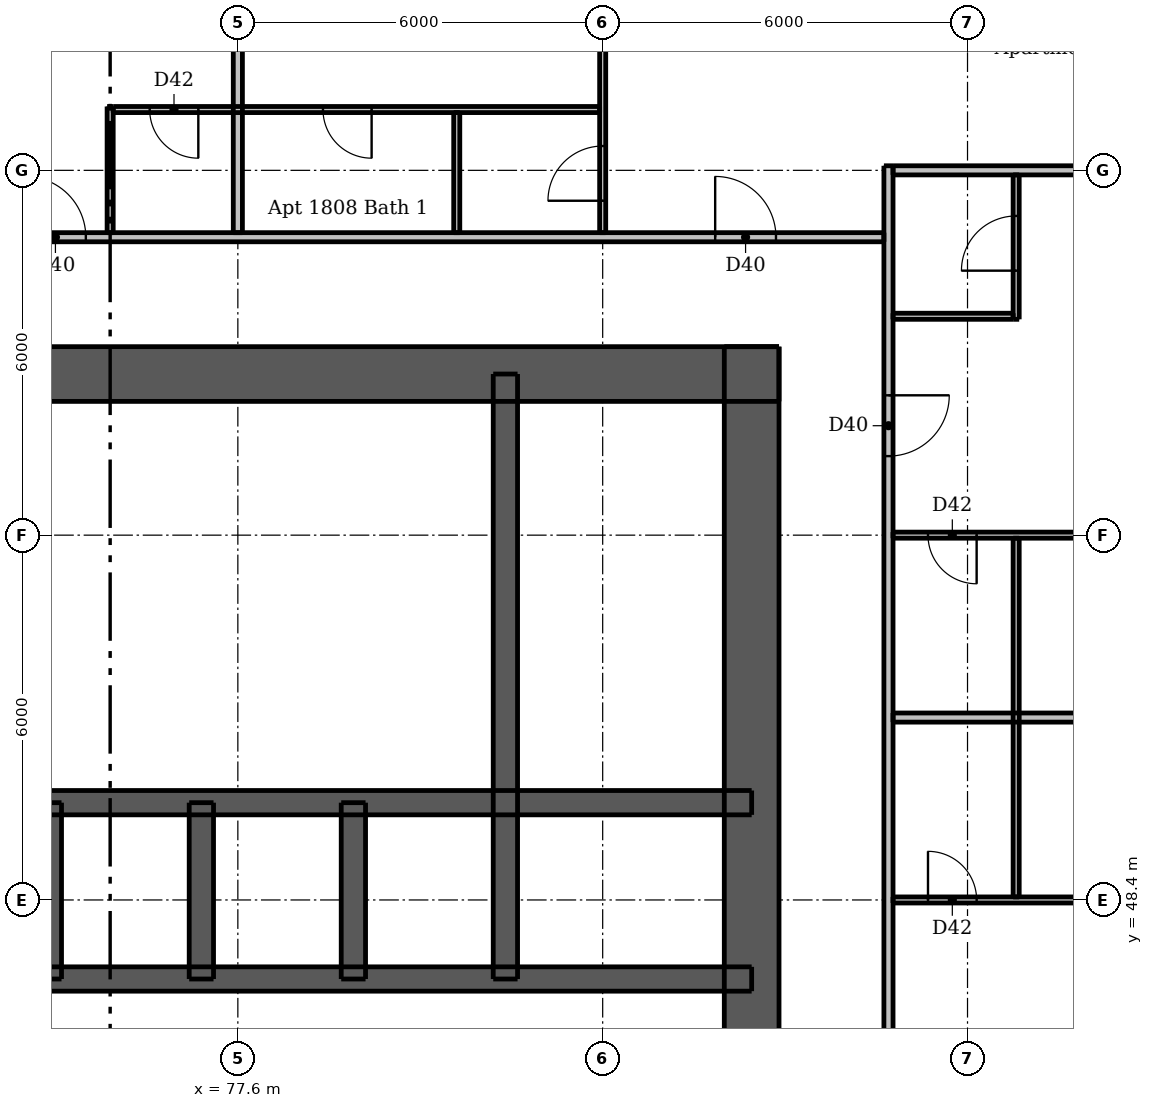
"""IFC4 building model, lengths in metres.
Left out: names, types, materials, properties, quantities, classifications, styles, units other than length and angle.
Written with IfcOpenShell. Run it as: python <this file> out.ifc"""

import sys

from ifc_helpers import new_model, si_unit, direction, frame, frame_2d, origin, place, context, subcontext, project, spatial, rectangle, extrude, element, fill, save


model = new_model("IFC4")
c1 = context("Model", 3, precision=1e-05, world=origin(), true_north=direction((0.0, 1.0)))
c2 = subcontext(c1, "Body", "Model", "MODEL_VIEW")
j1 = project(units=[si_unit("LENGTHUNIT", "METRE"), si_unit("PLANEANGLEUNIT", "RADIAN")], contexts=[c1])
p1 = place(None, origin())
s1 = spatial("IfcSite", under=j1, at=p1, CompositionType="ELEMENT")
p2 = place(p1, origin())
s2 = spatial("IfcBuilding", under=s1, at=p2, CompositionType="ELEMENT")
p3 = place(p2, frame((0.0, 0.0, 66.4)))
s3 = spatial("IfcBuildingStorey", under=s2, at=p3, CompositionType="ELEMENT", Elevation=66.4)
p4 = place(p3, frame((62.5, 57.05, 0.0), z_axis=(0.0, 0.0, 1.0), x_axis=(1.0, 0.0, 0.0)))
e1 = element("IfcWall", 1, at=p4, inside=s3, PredefinedType="SHEAR", context=c2, shape_type="SweptSolid", body=[
    extrude(rectangle(XDim=24.0, YDim=0.9, at=frame_2d((12.0, 0.0))), origin(), (0.0, 0.0, 1.0), 2.95),
])
p5 = place(p4, frame((20.85, 0.0, 0.0)))
e2 = element("IfcOpeningElement", 2, at=p5, cuts=e1, PredefinedType="OPENING", context=c2, shape_type="SweptSolid", body=[
    extrude(rectangle(XDim=1.1, YDim=2.1, at=frame_2d((0.55, 1.05))), frame((0.0, 0.46, 0.0), z_axis=(0.0, -1.0, 0.0), x_axis=(1.0, 0.0, 0.0)), (0.0, 0.0, 1.0), 0.92),
])
p6 = place(p4, frame((2.05, 0.0, 0.0)))
e3 = element("IfcOpeningElement", 3, at=p6, cuts=e1, PredefinedType="OPENING", context=c2, shape_type="SweptSolid", body=[
    extrude(rectangle(XDim=1.1, YDim=2.1, at=frame_2d((0.55, 1.05))), frame((0.0, 0.46, 0.0), z_axis=(0.0, -1.0, 0.0), x_axis=(1.0, 0.0, 0.0)), (0.0, 0.0, 1.0), 0.92),
])
p7 = place(p4, frame((6.44, 0.0, 0.0)))
e4 = element("IfcOpeningElement", 4, at=p7, cuts=e1, PredefinedType="OPENING", context=c2, shape_type="SweptSolid", body=[
    extrude(rectangle(XDim=0.9, YDim=2.1, at=frame_2d((0.45, 1.05))), frame((0.0, 0.46, 0.0), z_axis=(0.0, -1.0, 0.0), x_axis=(1.0, 0.0, 0.0)), (0.0, 0.0, 1.0), 0.92),
])
p8 = place(p4, frame((13.74, 0.0, 0.0)))
e5 = element("IfcOpeningElement", 5, at=p8, cuts=e1, PredefinedType="OPENING", context=c2, shape_type="SweptSolid", body=[
    extrude(rectangle(XDim=0.9, YDim=2.1, at=frame_2d((0.45, 1.05))), frame((0.0, 0.46, 0.0), z_axis=(0.0, -1.0, 0.0), x_axis=(1.0, 0.0, 0.0)), (0.0, 0.0, 1.0), 0.92),
])
p9 = place(p3, frame((86.05, 33.5, 0.0), z_axis=(0.0, 0.0, 1.0), x_axis=(0.0, 1.0, 0.0)))
e6 = element("IfcWall", 6, at=p9, inside=s3, PredefinedType="SHEAR", context=c2, shape_type="SweptSolid", body=[
    extrude(rectangle(XDim=24.0, YDim=0.9, at=frame_2d((12.0, 0.0))), origin(), (0.0, 0.0, 1.0), 2.95),
])
p10 = place(p9, frame((11.2, 0.0, 0.0)))
e7 = element("IfcOpeningElement", 7, at=p10, cuts=e6, PredefinedType="OPENING", context=c2, shape_type="SweptSolid", body=[
    extrude(rectangle(XDim=1.6, YDim=2.1, at=frame_2d((0.8, 1.05))), frame((0.0, 0.46, 0.0), z_axis=(0.0, -1.0, 0.0), x_axis=(1.0, 0.0, 0.0)), (0.0, 0.0, 1.0), 0.92),
])
p11 = place(p3, frame((62.95, 47.1, 0.0), z_axis=(0.0, 0.0, 1.0), x_axis=(1.0, 0.0, 0.0)))
e8 = element("IfcWall", 8, at=p11, inside=s3, PredefinedType="SHEAR", context=c2, shape_type="SweptSolid", body=[
    extrude(rectangle(XDim=23.1, YDim=0.4, at=frame_2d((11.55, 0.0))), origin(), (0.0, 0.0, 1.0), 2.95),
])
p12 = place(p11, frame((0.662, 0.0, 0.0)))
e9 = element("IfcOpeningElement", 9, at=p12, cuts=e8, PredefinedType="OPENING", context=c2, shape_type="SweptSolid", body=[
    extrude(rectangle(XDim=0.8, YDim=2.1, at=frame_2d((0.4, 1.05))), frame((0.0, 0.21, 0.0), z_axis=(0.0, -1.0, 0.0), x_axis=(1.0, 0.0, 0.0)), (0.0, 0.0, 1.0), 0.42),
])
p13 = place(p11, frame((2.312, 0.0, 0.0)))
e10 = element("IfcOpeningElement", 10, at=p13, cuts=e8, PredefinedType="OPENING", context=c2, shape_type="SweptSolid", body=[
    extrude(rectangle(XDim=0.9, YDim=2.1, at=frame_2d((0.45, 1.05))), frame((0.0, 0.21, 0.0), z_axis=(0.0, -1.0, 0.0), x_axis=(1.0, 0.0, 0.0)), (0.0, 0.0, 1.0), 0.42),
])
p14 = place(p11, frame((20.5, 0.0, 0.0)))
e11 = element("IfcOpeningElement", 11, at=p14, cuts=e8, PredefinedType="OPENING", context=c2, shape_type="SweptSolid", body=[
    extrude(rectangle(XDim=0.9, YDim=2.1, at=frame_2d((0.45, 1.05))), frame((0.0, 0.21, 0.0), z_axis=(0.0, -1.0, 0.0), x_axis=(1.0, 0.0, 0.0)), (0.0, 0.0, 1.0), 0.42),
])
p15 = place(p3, frame((62.95, 50.0, 0.0), z_axis=(0.0, 0.0, 1.0), x_axis=(1.0, 0.0, 0.0)))
e12 = element("IfcWall", 12, at=p15, inside=s3, PredefinedType="SHEAR", context=c2, shape_type="SweptSolid", body=[
    extrude(rectangle(XDim=23.1, YDim=0.4, at=frame_2d((11.55, 0.0))), origin(), (0.0, 0.0, 1.0), 2.95),
])
p16 = place(p3, frame((82.0, 47.1, 0.0), z_axis=(0.0, 0.0, 1.0), x_axis=(0.0, 1.0, 0.0)))
e13 = element("IfcWall", 13, at=p16, inside=s3, PredefinedType="SHEAR", context=c2, shape_type="SweptSolid", body=[
    extrude(rectangle(XDim=9.95, YDim=0.4, at=frame_2d((4.975, 0.0))), origin(), (0.0, 0.0, 1.0), 2.95),
])
for number, where, z_axis, x_axis in (
    (14, (74.5, 47.1, 0.0), (0.0, 0.0, 1.0), (0.0, 1.0, 0.0)),
    (15, (77.0, 47.1, 0.0), (0.0, 0.0, 1.0), (0.0, 1.0, 0.0)),
    (16, (79.5, 47.1, 0.0), (0.0, 0.0, 1.0), (0.0, 1.0, 0.0)),
):
    element("IfcWall", number, at=place(p3, frame(where, z_axis=z_axis, x_axis=x_axis)), inside=s3, PredefinedType="SHEAR", context=c2, shape_type="SweptSolid", body=[
        extrude(rectangle(XDim=2.9, YDim=0.4, at=frame_2d((1.45, 0.0))), origin(), (0.0, 0.0, 1.0), 2.95),
    ])
p17 = place(p3, frame((75.5, 59.375, 0.0), z_axis=(0.0, 0.0, 1.0), x_axis=(0.0, 1.0, 0.0)))
e17 = element("IfcWall", 17, at=p17, inside=s3, PredefinedType="PARTITIONING", context=c2, shape_type="SweptSolid", body=[
    extrude(rectangle(XDim=2.075, YDim=0.1, at=frame_2d((1.038, 0.0))), origin(), (0.0, 0.0, 1.0), 2.95),
])
p18 = place(p3, frame((81.2, 59.375, 0.0), z_axis=(0.0, 0.0, 1.0), x_axis=(0.0, 1.0, 0.0)))
e18 = element("IfcWall", 18, at=p18, inside=s3, PredefinedType="PARTITIONING", context=c2, shape_type="SweptSolid", body=[
    extrude(rectangle(XDim=1.975, YDim=0.1, at=frame_2d((0.988, 0.0))), origin(), (0.0, 0.0, 1.0), 2.95),
])
p19 = place(p3, frame((83.6, 59.375, 0.0), z_axis=(0.0, 0.0, 1.0), x_axis=(0.0, 1.0, 0.0)))
e19 = element("IfcWall", 19, at=p19, inside=s3, PredefinedType="PARTITIONING", context=c2, shape_type="SweptSolid", body=[
    extrude(rectangle(XDim=8.625, YDim=0.1, at=frame_2d((4.312, 0.0))), origin(), (0.0, 0.0, 1.0), 2.332),
])
p20 = place(p19, frame((0.525, 0.0, 0.0)))
e20 = element("IfcOpeningElement", 20, at=p20, cuts=e19, PredefinedType="OPENING", context=c2, shape_type="SweptSolid", body=[
    extrude(rectangle(XDim=0.9, YDim=2.1, at=frame_2d((0.45, 1.05))), frame((0.0, 0.06, 0.0), z_axis=(0.0, -1.0, 0.0), x_axis=(1.0, 0.0, 0.0)), (0.0, 0.0, 1.0), 0.12),
])
p21 = place(p19, frame((4.875, 0.0, 0.0)))
e21 = element("IfcOpeningElement", 21, at=p21, cuts=e19, PredefinedType="OPENING", context=c2, shape_type="SweptSolid", body=[
    extrude(rectangle(XDim=0.9, YDim=2.1, at=frame_2d((0.45, 1.05))), frame((0.0, 0.06, 0.0), z_axis=(0.0, -1.0, 0.0), x_axis=(1.0, 0.0, 0.0)), (0.0, 0.0, 1.0), 0.12),
])
p22 = place(p3, frame((90.4, 48.45, 0.0), z_axis=(0.0, 0.0, 1.0), x_axis=(0.0, 1.0, 0.0)))
e22 = element("IfcWall", 22, at=p22, inside=s3, PredefinedType="PARTITIONING", context=c2, shape_type="SweptSolid", body=[
    extrude(rectangle(XDim=5.9, YDim=0.1, at=frame_2d((2.95, 0.0))), origin(), (0.0, 0.0, 1.0), 2.95),
])
p23 = place(p3, frame((90.4, 57.95, 0.0), z_axis=(0.0, 0.0, 1.0), x_axis=(0.0, 1.0, 0.0)))
e23 = element("IfcWall", 23, at=p23, inside=s3, PredefinedType="PARTITIONING", context=c2, shape_type="SweptSolid", body=[
    extrude(rectangle(XDim=2.375, YDim=0.1, at=frame_2d((1.188, 0.0))), origin(), (0.0, 0.0, 1.0), 2.95),
])
p24 = place(p23, frame((0.8, 0.0, 0.0)))
e24 = element("IfcOpeningElement", 24, at=p24, cuts=e23, PredefinedType="OPENING", context=c2, shape_type="SweptSolid", body=[
    extrude(rectangle(XDim=0.9, YDim=2.1, at=frame_2d((0.45, 1.05))), frame((0.0, 0.06, 0.0), z_axis=(0.0, -1.0, 0.0), x_axis=(1.0, 0.0, 0.0)), (0.0, 0.0, 1.0), 0.12),
])
p25 = place(p3, frame((83.55, 61.4, 0.0), z_axis=(0.0, 0.0, 1.0), x_axis=(-1.0, 0.0, 0.0)))
e25 = element("IfcWall", 25, at=p25, inside=s3, PredefinedType="PARTITIONING", context=c2, shape_type="SweptSolid", body=[
    extrude(rectangle(XDim=8.0, YDim=0.1, at=frame_2d((4.0, 0.0))), origin(), (0.0, 0.0, 1.0), 2.95),
])
p26 = place(p25, frame((6.6, 0.0, 0.0)))
e26 = element("IfcOpeningElement", 26, at=p26, cuts=e25, PredefinedType="OPENING", context=c2, shape_type="SweptSolid", body=[
    extrude(rectangle(XDim=0.8, YDim=2.1, at=frame_2d((0.4, 1.05))), frame((0.0, 0.06, 0.0), z_axis=(0.0, -1.0, 0.0), x_axis=(1.0, 0.0, 0.0)), (0.0, 0.0, 1.0), 0.12),
])
p27 = place(p25, frame((3.75, 0.0, 0.0)))
e27 = element("IfcOpeningElement", 27, at=p27, cuts=e25, PredefinedType="OPENING", context=c2, shape_type="SweptSolid", body=[
    extrude(rectangle(XDim=0.8, YDim=2.1, at=frame_2d((0.4, 1.05))), frame((0.0, 0.06, 0.0), z_axis=(0.0, -1.0, 0.0), x_axis=(1.0, 0.0, 0.0)), (0.0, 0.0, 1.0), 0.12),
])
p28 = place(p3, frame((88.375, 58.0, 0.0), z_axis=(0.0, 0.0, 1.0), x_axis=(1.0, 0.0, 0.0)))
e28 = element("IfcWall", 28, at=p28, inside=s3, PredefinedType="PARTITIONING", context=c2, shape_type="SweptSolid", body=[
    extrude(rectangle(XDim=1.975, YDim=0.1, at=frame_2d((0.988, 0.0))), origin(), (0.0, 0.0, 1.0), 2.95),
])
p29 = place(p3, frame((98.5, 54.4, 0.0), z_axis=(0.0, 0.0, 1.0), x_axis=(-1.0, 0.0, 0.0)))
e29 = element("IfcWall", 29, at=p29, inside=s3, PredefinedType="PARTITIONING", context=c2, shape_type="SweptSolid", body=[
    extrude(rectangle(XDim=10.125, YDim=0.1, at=frame_2d((5.062, 0.0))), origin(), (0.0, 0.0, 1.0), 2.332),
])
p30 = place(p29, frame((3.6, 0.0, 0.0)))
e30 = element("IfcOpeningElement", 30, at=p30, cuts=e29, PredefinedType="OPENING", context=c2, shape_type="SweptSolid", body=[
    extrude(rectangle(XDim=0.9, YDim=2.1, at=frame_2d((0.45, 1.05))), frame((0.0, 0.06, 0.0), z_axis=(0.0, -1.0, 0.0), x_axis=(1.0, 0.0, 0.0)), (0.0, 0.0, 1.0), 0.12),
])
p31 = place(p29, frame((8.75, 0.0, 0.0)))
e31 = element("IfcOpeningElement", 31, at=p31, cuts=e29, PredefinedType="OPENING", context=c2, shape_type="SweptSolid", body=[
    extrude(rectangle(XDim=0.8, YDim=2.1, at=frame_2d((0.4, 1.05))), frame((0.0, 0.06, 0.0), z_axis=(0.0, -1.0, 0.0), x_axis=(1.0, 0.0, 0.0)), (0.0, 0.0, 1.0), 0.12),
])
p32 = place(p3, frame((88.375, 48.4, 0.0), z_axis=(0.0, 0.0, 1.0), x_axis=(1.0, 0.0, 0.0)))
e32 = element("IfcWall", 32, at=p32, inside=s3, PredefinedType="PARTITIONING", context=c2, shape_type="SweptSolid", body=[
    extrude(rectangle(XDim=10.125, YDim=0.1, at=frame_2d((5.062, 0.0))), origin(), (0.0, 0.0, 1.0), 2.332),
])
p33 = place(p32, frame((5.625, 0.0, 0.0)))
e33 = element("IfcOpeningElement", 33, at=p33, cuts=e32, PredefinedType="OPENING", context=c2, shape_type="SweptSolid", body=[
    extrude(rectangle(XDim=0.9, YDim=2.1, at=frame_2d((0.45, 1.05))), frame((0.0, 0.06, 0.0), z_axis=(0.0, -1.0, 0.0), x_axis=(1.0, 0.0, 0.0)), (0.0, 0.0, 1.0), 0.12),
])
p34 = place(p32, frame((0.575, 0.0, 0.0)))
e34 = element("IfcOpeningElement", 34, at=p34, cuts=e32, PredefinedType="OPENING", context=c2, shape_type="SweptSolid", body=[
    extrude(rectangle(XDim=0.8, YDim=2.1, at=frame_2d((0.4, 1.05))), frame((0.0, 0.06, 0.0), z_axis=(0.0, -1.0, 0.0), x_axis=(1.0, 0.0, 0.0)), (0.0, 0.0, 1.0), 0.12),
])
p35 = place(p3, frame((77.6, 59.375, 0.0), z_axis=(0.0, 0.0, 1.0), x_axis=(0.0, 1.0, 0.0)))
e35 = element("IfcWall", 35, at=p35, inside=s3, PredefinedType="PARTITIONING", context=c2, shape_type="SweptSolid", body=[
    extrude(rectangle(XDim=8.625, YDim=0.15, at=frame_2d((4.312, 0.0))), origin(), (0.0, 0.0, 1.0), 2.332),
])
p36 = place(p3, frame((88.3, 60.475, 0.0), z_axis=(0.0, 0.0, 1.0), x_axis=(0.0, -1.0, 0.0)))
e36 = element("IfcWall", 36, at=p36, inside=s3, PredefinedType="PARTITIONING", context=c2, shape_type="SweptSolid", body=[
    extrude(rectangle(XDim=28.7, YDim=0.15, at=frame_2d((14.35, 0.0))), origin(), (0.0, 0.0, 1.0), 2.95),
])
p37 = place(p36, frame((27.425, 0.0, 0.0)))
e37 = element("IfcOpeningElement", 37, at=p37, cuts=e36, PredefinedType="OPENING", context=c2, shape_type="SweptSolid", body=[
    extrude(rectangle(XDim=1.0, YDim=2.1, at=frame_2d((0.5, 1.05))), frame((0.0, 0.085, 0.0), z_axis=(0.0, -1.0, 0.0), x_axis=(1.0, 0.0, 0.0)), (0.0, 0.0, 1.0), 0.17),
])
p38 = place(p36, frame((14.525, 0.0, 0.0)))
e38 = element("IfcOpeningElement", 38, at=p38, cuts=e36, PredefinedType="OPENING", context=c2, shape_type="SweptSolid", body=[
    extrude(rectangle(XDim=1.0, YDim=2.1, at=frame_2d((0.5, 1.05))), frame((0.0, 0.085, 0.0), z_axis=(0.0, -1.0, 0.0), x_axis=(1.0, 0.0, 0.0)), (0.0, 0.0, 1.0), 0.17),
])
p39 = place(p36, frame((3.775, 0.0, 0.0)))
e39 = element("IfcOpeningElement", 39, at=p39, cuts=e36, PredefinedType="OPENING", context=c2, shape_type="SweptSolid", body=[
    extrude(rectangle(XDim=1.0, YDim=2.1, at=frame_2d((0.5, 1.05))), frame((0.0, 0.085, 0.0), z_axis=(0.0, -1.0, 0.0), x_axis=(1.0, 0.0, 0.0)), (0.0, 0.0, 1.0), 0.17),
])
p40 = place(p3, frame((88.375, 60.4, 0.0), z_axis=(0.0, 0.0, 1.0), x_axis=(1.0, 0.0, 0.0)))
e40 = element("IfcWall", 40, at=p40, inside=s3, PredefinedType="PARTITIONING", context=c2, shape_type="SweptSolid", body=[
    extrude(rectangle(XDim=11.625, YDim=0.15, at=frame_2d((5.812, 0.0))), origin(), (0.0, 0.0, 1.0), 2.332),
])
p41 = place(p3, frame((59.675, 59.3, 0.0), z_axis=(0.0, 0.0, 1.0), x_axis=(1.0, 0.0, 0.0)))
e41 = element("IfcWall", 41, at=p41, inside=s3, PredefinedType="PARTITIONING", context=c2, shape_type="SweptSolid", body=[
    extrude(rectangle(XDim=28.55, YDim=0.15, at=frame_2d((14.275, 0.0))), origin(), (0.0, 0.0, 1.0), 2.95),
])
p42 = place(p41, frame((3.625, 0.0, 0.0)))
e42 = element("IfcOpeningElement", 42, at=p42, cuts=e41, PredefinedType="OPENING", context=c2, shape_type="SweptSolid", body=[
    extrude(rectangle(XDim=1.0, YDim=2.1, at=frame_2d((0.5, 1.05))), frame((0.0, 0.085, 0.0), z_axis=(0.0, -1.0, 0.0), x_axis=(1.0, 0.0, 0.0)), (0.0, 0.0, 1.0), 0.17),
])
p43 = place(p41, frame((14.425, 0.0, 0.0)))
e43 = element("IfcOpeningElement", 43, at=p43, cuts=e41, PredefinedType="OPENING", context=c2, shape_type="SweptSolid", body=[
    extrude(rectangle(XDim=1.0, YDim=2.1, at=frame_2d((0.5, 1.05))), frame((0.0, 0.085, 0.0), z_axis=(0.0, -1.0, 0.0), x_axis=(1.0, 0.0, 0.0)), (0.0, 0.0, 1.0), 0.17),
])
p44 = place(p41, frame((25.775, 0.0, 0.0)))
e44 = element("IfcOpeningElement", 44, at=p44, cuts=e41, PredefinedType="OPENING", context=c2, shape_type="SweptSolid", body=[
    extrude(rectangle(XDim=1.0, YDim=2.1, at=frame_2d((0.5, 1.05))), frame((0.0, 0.085, 0.0), z_axis=(0.0, -1.0, 0.0), x_axis=(1.0, 0.0, 0.0)), (0.0, 0.0, 1.0), 0.17),
])
p45 = place(p3, frame((88.375, 51.4, 0.0), z_axis=(0.0, 0.0, 1.0), x_axis=(1.0, 0.0, 0.0)))
e45 = element("IfcWall", 45, at=p45, inside=s3, PredefinedType="PARTITIONING", context=c2, shape_type="SweptSolid", body=[
    extrude(rectangle(XDim=10.125, YDim=0.15, at=frame_2d((5.062, 0.0))), origin(), (0.0, 0.0, 1.0), 2.95),
])
p46 = place(p5, origin())
e46 = element("IfcDoor", 46, at=p46, inside=s3, OperationType="SINGLE_SWING_RIGHT", PredefinedType="DOOR", context=c2, shape_type="SweptSolid", body=[
    extrude(rectangle(XDim=1.1, YDim=2.1, at=frame_2d((0.55, 1.05))), frame((0.0, -0.388, 0.0), z_axis=(0.0, -1.0, 0.0), x_axis=(1.0, 0.0, 0.0)), (0.0, 0.0, 1.0), 0.05),
])
fill(e2, e46)
p47 = place(p14, origin())
e47 = element("IfcDoor", 47, at=p47, inside=s3, OperationType="SINGLE_SWING_LEFT", PredefinedType="DOOR", context=c2, shape_type="SweptSolid", body=[
    extrude(rectangle(XDim=0.9, YDim=2.1, at=frame_2d((0.45, 1.05))), frame((0.0, 0.188, 0.0), z_axis=(0.0, -1.0, 0.0), x_axis=(1.0, 0.0, 0.0)), (0.0, 0.0, 1.0), 0.05),
])
fill(e11, e47)
p48 = place(p8, origin())
e48 = element("IfcDoor", 48, at=p48, inside=s3, OperationType="SINGLE_SWING_RIGHT", PredefinedType="DOOR", context=c2, shape_type="SweptSolid", body=[
    extrude(rectangle(XDim=0.9, YDim=2.1, at=frame_2d((0.45, 1.05))), frame((0.0, -0.388, 0.0), z_axis=(0.0, -1.0, 0.0), x_axis=(1.0, 0.0, 0.0)), (0.0, 0.0, 1.0), 0.05),
])
fill(e5, e48)
p49 = place(p34, origin())
e49 = element("IfcDoor", 49, at=p49, inside=s3, OperationType="SINGLE_SWING_LEFT", PredefinedType="DOOR", context=c2, shape_type="SweptSolid", body=[
    extrude(rectangle(XDim=0.8, YDim=2.1, at=frame_2d((0.4, 1.05))), frame((0.0, 0.025, 0.0), z_axis=(0.0, -1.0, 0.0), x_axis=(1.0, 0.0, 0.0)), (0.0, 0.0, 1.0), 0.05),
])
fill(e34, e49)
p50 = place(p39, origin())
e50 = element("IfcDoor", 50, at=p50, inside=s3, OperationType="SINGLE_SWING_LEFT", PredefinedType="DOOR", context=c2, shape_type="SweptSolid", body=[
    extrude(rectangle(XDim=1.0, YDim=2.1, at=frame_2d((0.5, 1.05))), frame((0.0, 0.025, 0.0), z_axis=(0.0, -1.0, 0.0), x_axis=(1.0, 0.0, 0.0)), (0.0, 0.0, 1.0), 0.05),
])
fill(e39, e50)
p51 = place(p24, origin())
e51 = element("IfcDoor", 51, at=p51, inside=s3, OperationType="SINGLE_SWING_LEFT", PredefinedType="DOOR", context=c2, shape_type="SweptSolid", body=[
    extrude(rectangle(XDim=0.9, YDim=2.1, at=frame_2d((0.45, 1.05))), frame((0.0, 0.025, 0.0), z_axis=(0.0, -1.0, 0.0), x_axis=(1.0, 0.0, 0.0)), (0.0, 0.0, 1.0), 0.05),
])
fill(e24, e51)
p52 = place(p31, origin())
e52 = element("IfcDoor", 52, at=p52, inside=s3, OperationType="SINGLE_SWING_LEFT", PredefinedType="DOOR", context=c2, shape_type="SweptSolid", body=[
    extrude(rectangle(XDim=0.8, YDim=2.1, at=frame_2d((0.4, 1.05))), frame((0.0, 0.025, 0.0), z_axis=(0.0, -1.0, 0.0), x_axis=(1.0, 0.0, 0.0)), (0.0, 0.0, 1.0), 0.05),
])
fill(e31, e52)
p53 = place(p43, origin())
e53 = element("IfcDoor", 53, at=p53, inside=s3, OperationType="SINGLE_SWING_LEFT", PredefinedType="DOOR", context=c2, shape_type="SweptSolid", body=[
    extrude(rectangle(XDim=1.0, YDim=2.1, at=frame_2d((0.5, 1.05))), frame((0.0, 0.025, 0.0), z_axis=(0.0, -1.0, 0.0), x_axis=(1.0, 0.0, 0.0)), (0.0, 0.0, 1.0), 0.05),
])
fill(e43, e53)
p54 = place(p26, origin())
e54 = element("IfcDoor", 54, at=p54, inside=s3, OperationType="SINGLE_SWING_LEFT", PredefinedType="DOOR", context=c2, shape_type="SweptSolid", body=[
    extrude(rectangle(XDim=0.8, YDim=2.1, at=frame_2d((0.4, 1.05))), frame((0.0, 0.025, 0.0), z_axis=(0.0, -1.0, 0.0), x_axis=(1.0, 0.0, 0.0)), (0.0, 0.0, 1.0), 0.05),
])
fill(e26, e54)
p55 = place(p44, origin())
e55 = element("IfcDoor", 55, at=p55, inside=s3, OperationType="SINGLE_SWING_LEFT", PredefinedType="DOOR", context=c2, shape_type="SweptSolid", body=[
    extrude(rectangle(XDim=1.0, YDim=2.1, at=frame_2d((0.5, 1.05))), frame((0.0, 0.025, 0.0), z_axis=(0.0, -1.0, 0.0), x_axis=(1.0, 0.0, 0.0)), (0.0, 0.0, 1.0), 0.05),
])
fill(e44, e55)
p56 = place(p20, origin())
e56 = element("IfcDoor", 56, at=p56, inside=s3, OperationType="SINGLE_SWING_LEFT", PredefinedType="DOOR", context=c2, shape_type="SweptSolid", body=[
    extrude(rectangle(XDim=0.9, YDim=2.1, at=frame_2d((0.45, 1.05))), frame((0.0, 0.025, 0.0), z_axis=(0.0, -1.0, 0.0), x_axis=(1.0, 0.0, 0.0)), (0.0, 0.0, 1.0), 0.05),
])
fill(e20, e56)
p57 = place(p27, origin())
e57 = element("IfcDoor", 57, at=p57, inside=s3, OperationType="SINGLE_SWING_LEFT", PredefinedType="DOOR", context=c2, shape_type="SweptSolid", body=[
    extrude(rectangle(XDim=0.8, YDim=2.1, at=frame_2d((0.4, 1.05))), frame((0.0, 0.025, 0.0), z_axis=(0.0, -1.0, 0.0), x_axis=(1.0, 0.0, 0.0)), (0.0, 0.0, 1.0), 0.05),
])
fill(e27, e57)
save(model, sys.argv[1])
